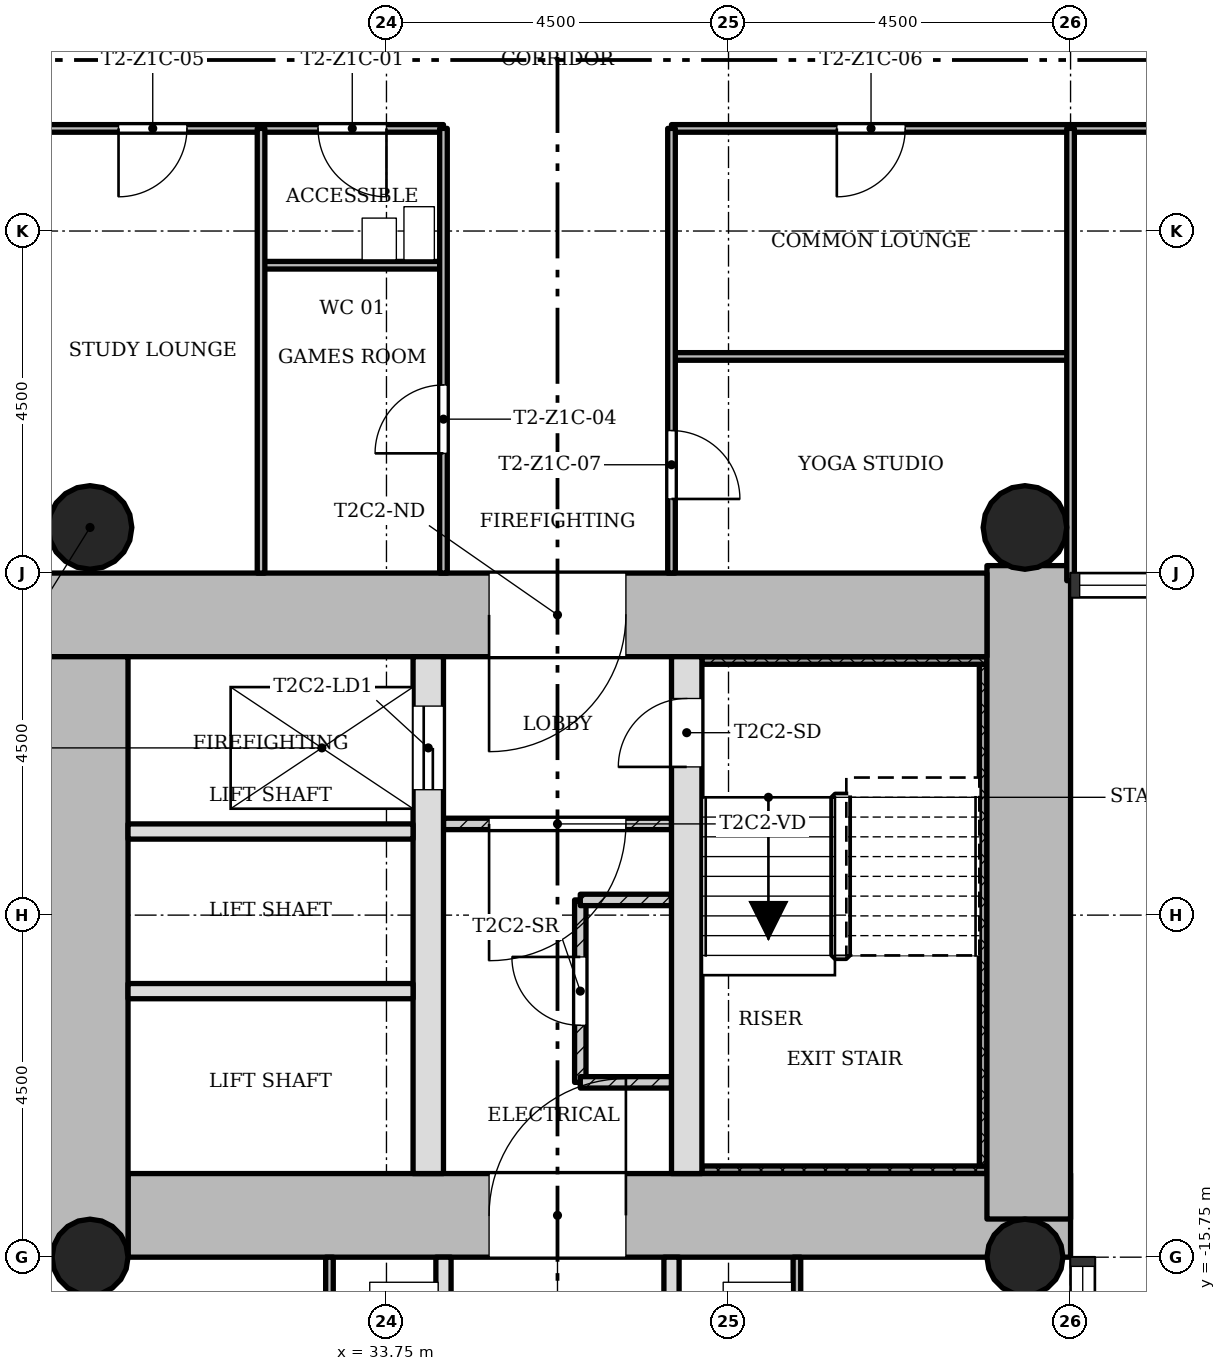
"""IFC4 building model, lengths in metres.
Left out: names, types, materials, properties, quantities, classifications, styles, units other than length and angle.
Written with IfcOpenShell. Run it as: python <this file> out.ifc"""

import sys

from ifc_helpers import new_model, si_unit, direction, frame, frame_2d, origin, origin_2d, place, context, subcontext, project, spatial, rectangle, hollow_circle, extrude, element, fill, save


model = new_model("IFC4")
c1 = context("Model", 3, precision=1e-05, world=origin(), true_north=direction((0.0, 1.0)))
c2 = subcontext(c1, "Body", "Model", "MODEL_VIEW")
j1 = project(units=[si_unit("LENGTHUNIT", "METRE"), si_unit("PLANEANGLEUNIT", "RADIAN")], contexts=[c1])
p1 = place(None, origin())
s1 = spatial("IfcSite", under=j1, at=p1, CompositionType="ELEMENT")
p2 = place(p1, origin())
s2 = spatial("IfcBuilding", under=s1, at=p2, CompositionType="ELEMENT")
p3 = place(p2, frame((0.0, 0.0, 48.3)))
s3 = spatial("IfcBuildingStorey", under=s2, at=p3, CompositionType="ELEMENT", Elevation=48.3)
p4 = place(p3, frame((30.35, -15.2, 0.0), z_axis=(0.0, 0.0, 1.0), x_axis=(1.0, 0.0, 0.0)))
e1 = element("IfcWall", 1, at=p4, inside=s3, PredefinedType="SHEAR", context=c2, shape_type="SweptSolid", body=[
    extrude(rectangle(XDim=12.4, YDim=1.1, at=frame_2d((6.2, 0.0))), origin(), (0.0, 0.0, 1.0), 3.4),
])
p5 = place(p4, frame((4.75, 0.0, 0.0)))
e2 = element("IfcOpeningElement", 2, at=p5, cuts=e1, PredefinedType="OPENING", context=c2, shape_type="SweptSolid", body=[
    extrude(rectangle(XDim=1.8, YDim=2.1, at=frame_2d((0.9, 1.05))), frame((0.0, 0.56, 0.0), z_axis=(0.0, -1.0, 0.0), x_axis=(1.0, 0.0, 0.0)), (0.0, 0.0, 1.0), 1.12),
])
p6 = place(p3, frame((42.2, -15.248, 0.0), z_axis=(0.0, 0.0, 1.0), x_axis=(0.0, 1.0, 0.0)))
e3 = element("IfcWall", 3, at=p6, inside=s3, PredefinedType="SHEAR", context=c2, shape_type="SweptSolid", body=[
    extrude(rectangle(XDim=8.596, YDim=1.1, at=frame_2d((4.298, 0.0))), origin(), (0.0, 0.0, 1.0), 3.4),
])
p7 = place(p3, frame((41.65, -7.3, 0.0), z_axis=(0.0, 0.0, 1.0), x_axis=(-1.0, 0.0, 0.0)))
e4 = element("IfcWall", 4, at=p7, inside=s3, PredefinedType="SHEAR", context=c2, shape_type="SweptSolid", body=[
    extrude(rectangle(XDim=12.4, YDim=1.1, at=frame_2d((6.2, 0.0))), origin(), (0.0, 0.0, 1.0), 3.4),
])
p8 = place(p7, frame((4.75, 0.0, 0.0)))
e5 = element("IfcOpeningElement", 5, at=p8, cuts=e4, PredefinedType="OPENING", context=c2, shape_type="SweptSolid", body=[
    extrude(rectangle(XDim=1.8, YDim=2.1, at=frame_2d((0.9, 1.05))), frame((0.0, 0.56, 0.0), z_axis=(0.0, -1.0, 0.0), x_axis=(1.0, 0.0, 0.0)), (0.0, 0.0, 1.0), 1.12),
])
p9 = place(p3, frame((29.8, -7.85, 0.0), z_axis=(0.0, 0.0, 1.0), x_axis=(0.0, -1.0, 0.0)))
e6 = element("IfcWall", 6, at=p9, inside=s3, PredefinedType="SHEAR", context=c2, shape_type="SweptSolid", body=[
    extrude(rectangle(XDim=7.9, YDim=1.1, at=frame_2d((3.95, 0.0))), origin(), (0.0, 0.0, 1.0), 3.4),
])
p10 = place(p3, frame((34.3, -14.65, 0.0), z_axis=(0.0, 0.0, 1.0), x_axis=(0.0, 1.0, 0.0)))
e7 = element("IfcWall", 7, at=p10, inside=s3, PredefinedType="SHEAR", context=c2, shape_type="SweptSolid", body=[
    extrude(rectangle(XDim=6.8, YDim=0.4, at=frame_2d((3.4, 0.0))), origin(), (0.0, 0.0, 1.0), 3.4),
])
p11 = place(p10, frame((5.05, 0.0, 0.0)))
e8 = element("IfcOpeningElement", 8, at=p11, cuts=e7, PredefinedType="OPENING", context=c2, shape_type="SweptSolid", body=[
    extrude(rectangle(XDim=1.1, YDim=2.1, at=frame_2d((0.55, 1.05))), frame((0.0, 0.21, 0.0), z_axis=(0.0, -1.0, 0.0), x_axis=(1.0, 0.0, 0.0)), (0.0, 0.0, 1.0), 0.42),
])
p12 = place(p3, frame((37.7, -14.65, 0.0), z_axis=(0.0, 0.0, 1.0), x_axis=(0.0, 1.0, 0.0)))
e9 = element("IfcWall", 9, at=p12, inside=s3, PredefinedType="SHEAR", context=c2, shape_type="SweptSolid", body=[
    extrude(rectangle(XDim=6.8, YDim=0.4, at=frame_2d((3.4, 0.0))), origin(), (0.0, 0.0, 1.0), 3.4),
])
p13 = place(p12, frame((5.35, 0.0, 0.0)))
e10 = element("IfcOpeningElement", 10, at=p13, cuts=e9, PredefinedType="OPENING", context=c2, shape_type="SweptSolid", body=[
    extrude(rectangle(XDim=0.9, YDim=2.1, at=frame_2d((0.45, 1.05))), frame((0.0, 0.21, 0.0), z_axis=(0.0, -1.0, 0.0), x_axis=(1.0, 0.0, 0.0)), (0.0, 0.0, 1.0), 0.42),
])
for number, where, z_axis, x_axis in (
    (11, (42.15, -15.75, 0.0), (0.0, 0.0, 1.0), (1.0, 0.0, 0.0)),
    (12, (29.85, -15.75, 0.0), (0.0, 0.0, 1.0), (1.0, 0.0, 0.0)),
):
    element("IfcColumn", number, at=place(p3, frame(where, z_axis=z_axis, x_axis=x_axis)), inside=s3, PredefinedType="COLUMN", context=c2, shape_type="SweptSolid", body=[
        extrude(hollow_circle(Radius=0.5, WallThickness=0.036, at=origin_2d()), origin(), (0.0, 0.0, 1.0), 3.4),
    ])
for number, where, z_axis, x_axis in (
    (13, (42.15, -6.15, 0.0), (0.0, 0.0, 1.0), (1.0, 0.0, 0.0)),
    (14, (29.85, -6.15, 0.0), (0.0, 0.0, 1.0), (1.0, 0.0, 0.0)),
):
    element("IfcColumn", number, at=place(p3, frame(where, z_axis=z_axis, x_axis=x_axis)), inside=s3, PredefinedType="COLUMN", context=c2, shape_type="SweptSolid", body=[
        extrude(hollow_circle(Radius=0.55, WallThickness=0.04, at=origin_2d()), origin(), (0.0, 0.0, 1.0), 3.4),
    ])
p14 = place(p3, frame((34.5, -10.05, 0.0), z_axis=(0.0, 0.0, 1.0), x_axis=(1.0, 0.0, 0.0)))
e15 = element("IfcWall", 15, at=p14, inside=s3, PredefinedType="PARTITIONING", context=c2, shape_type="SweptSolid", body=[
    extrude(rectangle(XDim=3.0, YDim=0.15, at=frame_2d((1.5, 0.0))), origin(), (0.0, 0.0, 1.0), 3.0),
])
p15 = place(p14, frame((0.6, 0.0, 0.0)))
e16 = element("IfcOpeningElement", 16, at=p15, cuts=e15, PredefinedType="OPENING", context=c2, shape_type="SweptSolid", body=[
    extrude(rectangle(XDim=1.8, YDim=2.1, at=frame_2d((0.9, 1.05))), frame((0.0, 0.085, 0.0), z_axis=(0.0, -1.0, 0.0), x_axis=(1.0, 0.0, 0.0)), (0.0, 0.0, 1.0), 0.17),
])
for number, where, z_axis, x_axis in (
    (17, (30.35, -10.15, 0.0), (0.0, 0.0, 1.0), (1.0, 0.0, 0.0)),
    (18, (30.35, -12.25, 0.0), (0.0, 0.0, 1.0), (1.0, 0.0, 0.0)),
):
    element("IfcWall", number, at=place(p3, frame(where, z_axis=z_axis, x_axis=x_axis)), inside=s3, PredefinedType="SOLIDWALL", context=c2, shape_type="SweptSolid", body=[
        extrude(rectangle(XDim=3.75, YDim=0.2, at=frame_2d((1.875, 0.0))), origin(), (0.0, 0.0, 1.0), 3.0),
    ])
p16 = place(p3, frame((36.3, -11.05, 0.0), z_axis=(0.0, 0.0, 1.0), x_axis=(0.0, -1.0, 0.0)))
e19 = element("IfcWall", 19, at=p16, inside=s3, PredefinedType="PARTITIONING", context=c2, shape_type="SweptSolid", body=[
    extrude(rectangle(XDim=2.4, YDim=0.15, at=frame_2d((1.2, 0.0))), origin(), (0.0, 0.0, 1.0), 3.0),
])
p17 = place(p16, frame((0.75, 0.0, 0.0)))
e20 = element("IfcOpeningElement", 20, at=p17, cuts=e19, PredefinedType="OPENING", context=c2, shape_type="SweptSolid", body=[
    extrude(rectangle(XDim=0.9, YDim=2.1, at=frame_2d((0.45, 1.05))), frame((0.0, 0.085, 0.0), z_axis=(0.0, -1.0, 0.0), x_axis=(1.0, 0.0, 0.0)), (0.0, 0.0, 1.0), 0.17),
])
for number, where, z_axis, x_axis in (
    (21, (36.3, -11.05, 0.0), (0.0, 0.0, 1.0), (1.0, 0.0, 0.0)),
    (22, (36.3, -13.45, 0.0), (0.0, 0.0, 1.0), (1.0, 0.0, 0.0)),
):
    element("IfcWall", number, at=place(p3, frame(where, z_axis=z_axis, x_axis=x_axis)), inside=s3, PredefinedType="PARTITIONING", context=c2, shape_type="SweptSolid", body=[
        extrude(rectangle(XDim=1.2, YDim=0.15, at=frame_2d((0.6, 0.0))), origin(), (0.0, 0.0, 1.0), 3.0),
    ])
p18 = place(p3, frame((42.75, -3.9, 0.0), z_axis=(0.0, 0.0, 1.0), x_axis=(-1.0, 0.0, 0.0)))
e23 = element("IfcWall", 23, at=p18, inside=s3, PredefinedType="PARTITIONING", context=c2, shape_type="SweptSolid", body=[
    extrude(rectangle(XDim=5.25, YDim=0.1, at=frame_2d((2.625, 0.0))), origin(), (0.0, 0.0, 1.0), 3.0),
])
p19 = place(p3, frame((34.5, -2.7, 0.0), z_axis=(0.0, 0.0, 1.0), x_axis=(-1.0, 0.0, 0.0)))
e24 = element("IfcWall", 24, at=p19, inside=s3, PredefinedType="PARTITIONING", context=c2, shape_type="SweptSolid", body=[
    extrude(rectangle(XDim=2.4, YDim=0.1, at=frame_2d((1.2, 0.0))), origin(), (0.0, 0.0, 1.0), 3.0),
])
p20 = place(p3, frame((44.55, -0.9, 0.0), z_axis=(0.0, 0.0, 1.0), x_axis=(-1.0, 0.0, 0.0)))
e25 = element("IfcWall", 25, at=p20, inside=s3, PredefinedType="PARTITIONING", context=c2, shape_type="SweptSolid", body=[
    extrude(rectangle(XDim=7.05, YDim=0.1, at=frame_2d((3.525, 0.0))), origin(), (0.0, 0.0, 1.0), 3.0),
])
p21 = place(p20, frame((3.975, 0.0, 0.0)))
e26 = element("IfcOpeningElement", 26, at=p21, cuts=e25, PredefinedType="OPENING", context=c2, shape_type="SweptSolid", body=[
    extrude(rectangle(XDim=0.9, YDim=2.1, at=frame_2d((0.45, 1.05))), frame((0.0, 0.06, 0.0), z_axis=(0.0, -1.0, 0.0), x_axis=(1.0, 0.0, 0.0)), (0.0, 0.0, 1.0), 0.12),
])
p22 = place(p3, frame((34.5, -0.9, 0.0), z_axis=(0.0, 0.0, 1.0), x_axis=(-1.0, 0.0, 0.0)))
e27 = element("IfcWall", 27, at=p22, inside=s3, PredefinedType="PARTITIONING", context=c2, shape_type="SweptSolid", body=[
    extrude(rectangle(XDim=7.05, YDim=0.1, at=frame_2d((3.525, 0.0))), origin(), (0.0, 0.0, 1.0), 3.0),
])
p23 = place(p22, frame((0.75, 0.0, 0.0)))
e28 = element("IfcOpeningElement", 28, at=p23, cuts=e27, PredefinedType="OPENING", context=c2, shape_type="SweptSolid", body=[
    extrude(rectangle(XDim=0.9, YDim=2.1, at=frame_2d((0.45, 1.05))), frame((0.0, 0.06, 0.0), z_axis=(0.0, -1.0, 0.0), x_axis=(1.0, 0.0, 0.0)), (0.0, 0.0, 1.0), 0.12),
])
p24 = place(p22, frame((3.375, 0.0, 0.0)))
e29 = element("IfcOpeningElement", 29, at=p24, cuts=e27, PredefinedType="OPENING", context=c2, shape_type="SweptSolid", body=[
    extrude(rectangle(XDim=0.9, YDim=2.1, at=frame_2d((0.45, 1.05))), frame((0.0, 0.06, 0.0), z_axis=(0.0, -1.0, 0.0), x_axis=(1.0, 0.0, 0.0)), (0.0, 0.0, 1.0), 0.12),
])
p25 = place(p3, frame((42.75, -6.85, 0.0), z_axis=(0.0, 0.0, 1.0), x_axis=(0.0, 1.0, 0.0)))
e30 = element("IfcWall", 30, at=p25, inside=s3, PredefinedType="PARTITIONING", context=c2, shape_type="SweptSolid", body=[
    extrude(rectangle(XDim=5.95, YDim=0.1, at=frame_2d((2.975, 0.0))), origin(), (0.0, 0.0, 1.0), 3.0),
])
p26 = place(p3, frame((39.15, -20.25, 0.0), z_axis=(0.0, 0.0, 1.0), x_axis=(0.0, 1.0, 0.0)))
e31 = element("IfcWall", 31, at=p26, inside=s3, PredefinedType="PARTITIONING", context=c2, shape_type="SweptSolid", body=[
    extrude(rectangle(XDim=4.5, YDim=0.1, at=frame_2d((2.25, 0.0))), origin(), (0.0, 0.0, 1.0), 3.0),
])
p27 = place(p26, frame((0.6, 0.0, 0.0)))
e32 = element("IfcOpeningElement", 32, at=p27, cuts=e31, PredefinedType="OPENING", context=c2, shape_type="SweptSolid", body=[
    extrude(rectangle(XDim=0.9, YDim=2.1, at=frame_2d((0.45, 1.05))), frame((0.0, 0.06, 0.0), z_axis=(0.0, -1.0, 0.0), x_axis=(1.0, 0.0, 0.0)), (0.0, 0.0, 1.0), 0.12),
])
p28 = place(p3, frame((37.5, -6.75, 0.0), z_axis=(0.0, 0.0, 1.0), x_axis=(0.0, 1.0, 0.0)))
e33 = element("IfcWall", 33, at=p28, inside=s3, PredefinedType="PARTITIONING", context=c2, shape_type="SweptSolid", body=[
    extrude(rectangle(XDim=5.85, YDim=0.1, at=frame_2d((2.925, 0.0))), origin(), (0.0, 0.0, 1.0), 3.0),
])
p29 = place(p28, frame((0.975, 0.0, 0.0)))
e34 = element("IfcOpeningElement", 34, at=p29, cuts=e33, PredefinedType="OPENING", context=c2, shape_type="SweptSolid", body=[
    extrude(rectangle(XDim=0.9, YDim=2.1, at=frame_2d((0.45, 1.05))), frame((0.0, 0.06, 0.0), z_axis=(0.0, -1.0, 0.0), x_axis=(1.0, 0.0, 0.0)), (0.0, 0.0, 1.0), 0.12),
])
p30 = place(p3, frame((37.5, -20.25, 0.0), z_axis=(0.0, 0.0, 1.0), x_axis=(0.0, 1.0, 0.0)))
e35 = element("IfcWall", 35, at=p30, inside=s3, PredefinedType="SOLIDWALL", context=c2, shape_type="SweptSolid", body=[
    extrude(rectangle(XDim=4.5, YDim=0.2, at=frame_2d((2.25, 0.0))), origin(), (0.0, 0.0, 1.0), 3.0),
])
p31 = place(p30, frame((0.6, 0.0, 0.0)))
e36 = element("IfcOpeningElement", 36, at=p31, cuts=e35, PredefinedType="OPENING", context=c2, shape_type="SweptSolid", body=[
    extrude(rectangle(XDim=0.9, YDim=2.1, at=frame_2d((0.45, 1.05))), frame((0.0, 0.11, 0.0), z_axis=(0.0, -1.0, 0.0), x_axis=(1.0, 0.0, 0.0)), (0.0, 0.0, 1.0), 0.22),
])
p32 = place(p3, frame((34.5, -6.75, 0.0), z_axis=(0.0, 0.0, 1.0), x_axis=(0.0, 1.0, 0.0)))
e37 = element("IfcWall", 37, at=p32, inside=s3, PredefinedType="PARTITIONING", context=c2, shape_type="SweptSolid", body=[
    extrude(rectangle(XDim=5.85, YDim=0.1, at=frame_2d((2.925, 0.0))), origin(), (0.0, 0.0, 1.0), 3.0),
])
p33 = place(p32, frame((1.575, 0.0, 0.0)))
e38 = element("IfcOpeningElement", 38, at=p33, cuts=e37, PredefinedType="OPENING", context=c2, shape_type="SweptSolid", body=[
    extrude(rectangle(XDim=0.9, YDim=2.1, at=frame_2d((0.45, 1.05))), frame((0.0, 0.06, 0.0), z_axis=(0.0, -1.0, 0.0), x_axis=(1.0, 0.0, 0.0)), (0.0, 0.0, 1.0), 0.12),
])
p34 = place(p3, frame((34.5, -20.25, 0.0), z_axis=(0.0, 0.0, 1.0), x_axis=(0.0, 1.0, 0.0)))
e39 = element("IfcWall", 39, at=p34, inside=s3, PredefinedType="SOLIDWALL", context=c2, shape_type="SweptSolid", body=[
    extrude(rectangle(XDim=4.5, YDim=0.2, at=frame_2d((2.25, 0.0))), origin(), (0.0, 0.0, 1.0), 3.0),
])
p35 = place(p34, frame((0.6, 0.0, 0.0)))
e40 = element("IfcOpeningElement", 40, at=p35, cuts=e39, PredefinedType="OPENING", context=c2, shape_type="SweptSolid", body=[
    extrude(rectangle(XDim=0.9, YDim=2.1, at=frame_2d((0.45, 1.05))), frame((0.0, 0.11, 0.0), z_axis=(0.0, -1.0, 0.0), x_axis=(1.0, 0.0, 0.0)), (0.0, 0.0, 1.0), 0.22),
])
p36 = place(p3, frame((33.0, -18.15, 0.0), z_axis=(0.0, 0.0, 1.0), x_axis=(0.0, 1.0, 0.0)))
e41 = element("IfcWall", 41, at=p36, inside=s3, PredefinedType="PARTITIONING", context=c2, shape_type="SweptSolid", body=[
    extrude(rectangle(XDim=2.4, YDim=0.1, at=frame_2d((1.2, 0.0))), origin(), (0.0, 0.0, 1.0), 3.0),
])
p37 = place(p36, frame((0.75, 0.0, 0.0)))
e42 = element("IfcOpeningElement", 42, at=p37, cuts=e41, PredefinedType="OPENING", context=c2, shape_type="SweptSolid", body=[
    extrude(rectangle(XDim=0.9, YDim=2.1, at=frame_2d((0.45, 1.05))), frame((0.0, 0.06, 0.0), z_axis=(0.0, -1.0, 0.0), x_axis=(1.0, 0.0, 0.0)), (0.0, 0.0, 1.0), 0.12),
])
p38 = place(p3, frame((32.1, -6.75, 0.0), z_axis=(0.0, 0.0, 1.0), x_axis=(0.0, 1.0, 0.0)))
e43 = element("IfcWall", 43, at=p38, inside=s3, PredefinedType="PARTITIONING", context=c2, shape_type="SweptSolid", body=[
    extrude(rectangle(XDim=5.85, YDim=0.1, at=frame_2d((2.925, 0.0))), origin(), (0.0, 0.0, 1.0), 3.0),
])
p39 = place(p3, frame((37.9, -14.6, 0.0), z_axis=(0.0, 0.0, 1.0), x_axis=(1.0, 0.0, 0.0)))
e44 = element("IfcWall", 44, at=p39, inside=s3, PredefinedType="SHEAR", context=c2, shape_type="SweptSolid", body=[
    extrude(rectangle(XDim=3.75, YDim=0.1, at=frame_2d((1.875, 0.0))), origin(), (0.0, 0.0, 1.0), 3.4),
])
p40 = place(p3, frame((41.6, -7.95, 0.0), z_axis=(0.0, 0.0, 1.0), x_axis=(0.0, -1.0, 0.0)))
e45 = element("IfcWall", 45, at=p40, inside=s3, PredefinedType="SHEAR", context=c2, shape_type="SweptSolid", body=[
    extrude(rectangle(XDim=6.6, YDim=0.1, at=frame_2d((3.3, 0.0))), origin(), (0.0, 0.0, 1.0), 3.4),
])
p41 = place(p3, frame((37.9, -7.9, 0.0), z_axis=(0.0, 0.0, 1.0), x_axis=(1.0, 0.0, 0.0)))
e46 = element("IfcWall", 46, at=p41, inside=s3, PredefinedType="SHEAR", context=c2, shape_type="SweptSolid", body=[
    extrude(rectangle(XDim=3.75, YDim=0.1, at=frame_2d((1.875, 0.0))), origin(), (0.0, 0.0, 1.0), 3.4),
])
p42 = place(p15, origin())
e47 = element("IfcDoor", 47, at=p42, inside=s3, OperationType="SINGLE_SWING_LEFT", PredefinedType="DOOR", context=c2, shape_type="SweptSolid", body=[
    extrude(rectangle(XDim=1.8, YDim=2.1, at=frame_2d((0.9, 1.05))), frame((0.0, 0.025, 0.0), z_axis=(0.0, -1.0, 0.0), x_axis=(1.0, 0.0, 0.0)), (0.0, 0.0, 1.0), 0.05),
])
fill(e16, e47)
p43 = place(p17, origin())
e48 = element("IfcDoor", 48, at=p43, inside=s3, OperationType="SINGLE_SWING_LEFT", PredefinedType="DOOR", context=c2, shape_type="SweptSolid", body=[
    extrude(rectangle(XDim=0.9, YDim=2.1, at=frame_2d((0.45, 1.05))), frame((0.0, 0.025, 0.0), z_axis=(0.0, -1.0, 0.0), x_axis=(1.0, 0.0, 0.0)), (0.0, 0.0, 1.0), 0.05),
])
fill(e20, e48)
p44 = place(p23, origin())
e49 = element("IfcDoor", 49, at=p44, inside=s3, OperationType="SINGLE_SWING_RIGHT", PredefinedType="DOOR", context=c2, shape_type="SweptSolid", body=[
    extrude(rectangle(XDim=0.9, YDim=2.1, at=frame_2d((0.45, 1.05))), frame((0.0, 0.025, 0.0), z_axis=(0.0, -1.0, 0.0), x_axis=(1.0, 0.0, 0.0)), (0.0, 0.0, 1.0), 0.05),
])
fill(e28, e49)
p45 = place(p33, origin())
e50 = element("IfcDoor", 50, at=p45, inside=s3, OperationType="SINGLE_SWING_RIGHT", PredefinedType="DOOR", context=c2, shape_type="SweptSolid", body=[
    extrude(rectangle(XDim=0.9, YDim=2.1, at=frame_2d((0.45, 1.05))), frame((0.0, 0.025, 0.0), z_axis=(0.0, -1.0, 0.0), x_axis=(1.0, 0.0, 0.0)), (0.0, 0.0, 1.0), 0.05),
])
fill(e38, e50)
p46 = place(p24, origin())
e51 = element("IfcDoor", 51, at=p46, inside=s3, OperationType="SINGLE_SWING_LEFT", PredefinedType="DOOR", context=c2, shape_type="SweptSolid", body=[
    extrude(rectangle(XDim=0.9, YDim=2.1, at=frame_2d((0.45, 1.05))), frame((0.0, 0.025, 0.0), z_axis=(0.0, -1.0, 0.0), x_axis=(1.0, 0.0, 0.0)), (0.0, 0.0, 1.0), 0.05),
])
fill(e29, e51)
p47 = place(p21, origin())
e52 = element("IfcDoor", 52, at=p47, inside=s3, OperationType="SINGLE_SWING_LEFT", PredefinedType="DOOR", context=c2, shape_type="SweptSolid", body=[
    extrude(rectangle(XDim=0.9, YDim=2.1, at=frame_2d((0.45, 1.05))), frame((0.0, 0.025, 0.0), z_axis=(0.0, -1.0, 0.0), x_axis=(1.0, 0.0, 0.0)), (0.0, 0.0, 1.0), 0.05),
])
fill(e26, e52)
p48 = place(p29, origin())
e53 = element("IfcDoor", 53, at=p48, inside=s3, OperationType="SINGLE_SWING_LEFT", PredefinedType="DOOR", context=c2, shape_type="SweptSolid", body=[
    extrude(rectangle(XDim=0.9, YDim=2.1, at=frame_2d((0.45, 1.05))), frame((0.0, 0.025, 0.0), z_axis=(0.0, -1.0, 0.0), x_axis=(1.0, 0.0, 0.0)), (0.0, 0.0, 1.0), 0.05),
])
fill(e34, e53)
p49 = place(p13, origin())
e54 = element("IfcDoor", 54, at=p49, inside=s3, OperationType="SINGLE_SWING_RIGHT", PredefinedType="DOOR", context=c2, shape_type="SweptSolid", body=[
    extrude(rectangle(XDim=0.9, YDim=2.1, at=frame_2d((0.45, 1.05))), frame((0.0, 0.025, 0.0), z_axis=(0.0, -1.0, 0.0), x_axis=(1.0, 0.0, 0.0)), (0.0, 0.0, 1.0), 0.05),
])
fill(e10, e54)
p50 = place(p11, origin())
e55 = element("IfcDoor", 55, at=p50, inside=s3, OperationType="SLIDING_TO_LEFT", PredefinedType="DOOR", context=c2, shape_type="SweptSolid", body=[
    extrude(rectangle(XDim=1.1, YDim=2.1, at=frame_2d((0.55, 1.05))), frame((0.0, 0.025, 0.0), z_axis=(0.0, -1.0, 0.0), x_axis=(1.0, 0.0, 0.0)), (0.0, 0.0, 1.0), 0.05),
])
fill(e8, e55)
p51 = place(p8, origin())
e56 = element("IfcDoor", 56, at=p51, inside=s3, OperationType="SINGLE_SWING_LEFT", PredefinedType="DOOR", context=c2, shape_type="SweptSolid", body=[
    extrude(rectangle(XDim=1.8, YDim=2.1, at=frame_2d((0.9, 1.05))), frame((0.0, 0.025, 0.0), z_axis=(0.0, -1.0, 0.0), x_axis=(1.0, 0.0, 0.0)), (0.0, 0.0, 1.0), 0.05),
])
fill(e5, e56)
p52 = place(p5, origin())
e57 = element("IfcDoor", 57, at=p52, inside=s3, OperationType="SINGLE_SWING_LEFT", PredefinedType="DOOR", context=c2, shape_type="SweptSolid", body=[
    extrude(rectangle(XDim=1.8, YDim=2.1, at=frame_2d((0.9, 1.05))), frame((0.0, 0.025, 0.0), z_axis=(0.0, -1.0, 0.0), x_axis=(1.0, 0.0, 0.0)), (0.0, 0.0, 1.0), 0.05),
])
fill(e2, e57)
save(model, sys.argv[1])
